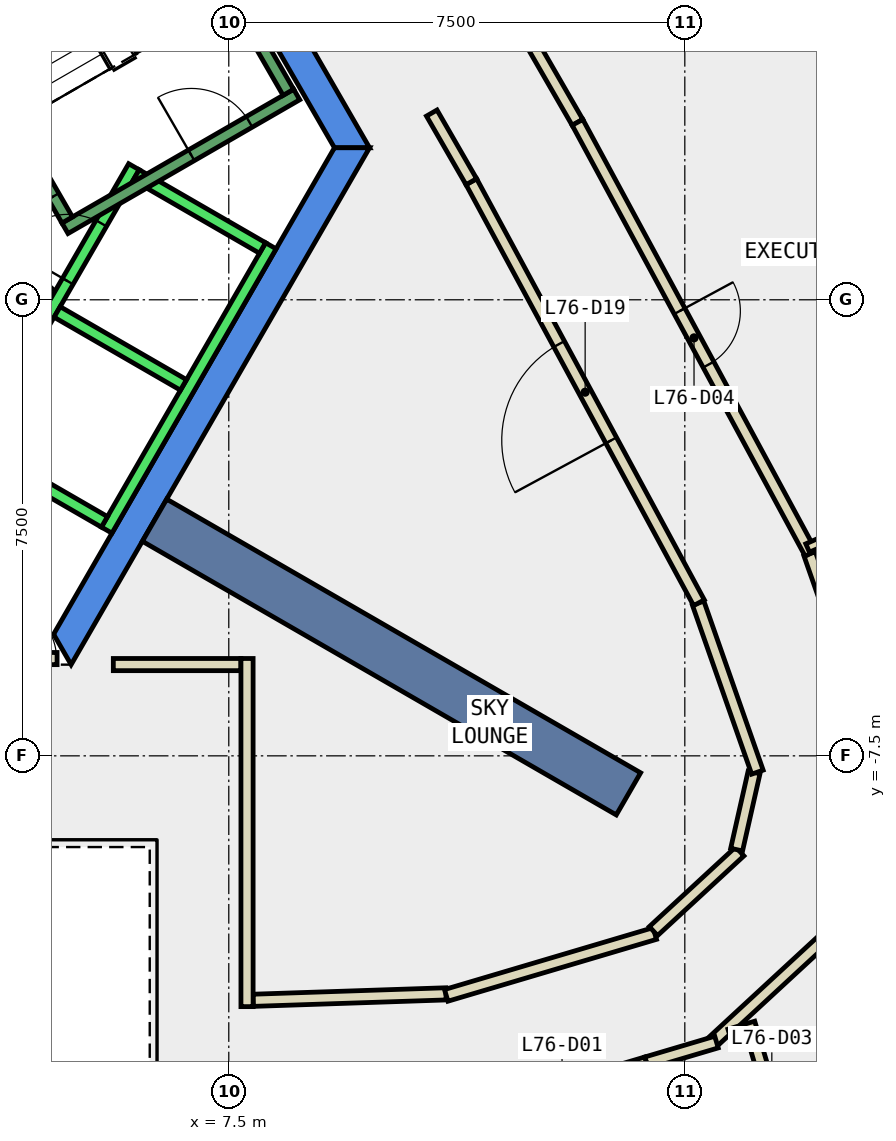
"""IFC4 building model, lengths in metres.
Left out: names, types, materials, properties, quantities, classifications, styles, units other than length and angle.
Written with IfcOpenShell. Run it as: python <this file> out.ifc"""

import sys

from ifc_helpers import new_model, si_unit, direction, frame, frame_2d, origin, place, context, subcontext, project, spatial, polyline, rectangle, outline, extrude, element, fill, save


model = new_model("IFC4")
c1 = context("Model", 3, precision=1e-05, world=origin(), true_north=direction((0.0, 1.0)))
c2 = subcontext(c1, "Body", "Model", "MODEL_VIEW")
j1 = project(units=[si_unit("LENGTHUNIT", "METRE"), si_unit("PLANEANGLEUNIT", "RADIAN")], contexts=[c1])
p1 = place(None, origin())
s1 = spatial("IfcSite", under=j1, at=p1, CompositionType="ELEMENT")
p2 = place(p1, origin())
s2 = spatial("IfcBuilding", under=s1, at=p2, CompositionType="ELEMENT")
p3 = place(p2, frame((0.0, 0.0, 322.4)))
s3 = spatial("IfcBuildingStorey", under=s2, at=p3, CompositionType="ELEMENT", Elevation=322.4)
p4 = place(p3, frame((0.0, 0.0, -0.34)))
e1 = element("IfcWall", 1, at=p4, inside=s3, PredefinedType="SHEAR", context=c2, shape_type="SweptSolid", body=[
    extrude(outline(polyline([(5.486, 9.998), (5.053, 9.748), (9.238, 2.5), (9.815, 2.5), (5.486, 9.998)])), origin(), (0.0, 0.0, 1.0), 3.34),
])
p5 = place(p3, frame((0.0, 0.0, -0.34)))
e2 = element("IfcWall", 2, at=p5, inside=s3, PredefinedType="SHEAR", context=c2, shape_type="SweptSolid", body=[
    extrude(outline(polyline([(4.907, -6.0), (9.815, 2.5), (9.238, 2.5), (4.619, -5.5), (4.907, -6.0)])), origin(), (0.0, 0.0, 1.0), 3.34),
])
p6 = place(p3, frame((6.279, -3.625, -0.34), z_axis=(0.0, 0.0, 1.0), x_axis=(0.866017533419, -0.500013631625, 0.0)))
e3 = element("IfcWall", 3, at=p6, inside=s3, PredefinedType="SHEAR", context=c2, shape_type="SweptSolid", body=[
    extrude(rectangle(XDim=9.0, YDim=0.8, at=frame_2d((4.5, 0.0))), origin(), (0.0, 0.0, 1.0), 3.34),
])
p7 = place(p3, frame((7.9, -11.52, 0.0), z_axis=(0.0, 0.0, 1.0), x_axis=(0.999442599499, 0.033383982774, 0.0)))
e4 = element("IfcWall", 4, at=p7, inside=s3, PredefinedType="PARTITIONING", context=c2, shape_type="SweptSolid", body=[
    extrude(rectangle(XDim=3.174, YDim=0.2, at=frame_2d((1.587, 0.0))), origin(), (0.0, 0.0, 1.0), 3.0),
])
p8 = place(p3, frame((11.076, -11.439, 0.0), z_axis=(0.0, 0.0, 1.0), x_axis=(0.958760241353, 0.284216114252, 0.0)))
e5 = element("IfcWall", 5, at=p8, inside=s3, PredefinedType="PARTITIONING", context=c2, shape_type="SweptSolid", body=[
    extrude(rectangle(XDim=3.578, YDim=0.2, at=frame_2d((1.789, 0.0))), origin(), (0.0, 0.0, 1.0), 3.0),
])
p9 = place(p3, frame((14.484, -10.382, 0.0), z_axis=(0.0, 0.0, 1.0), x_axis=(0.735026247728, 0.678038653139, 0.0)))
e6 = element("IfcWall", 6, at=p9, inside=s3, PredefinedType="PARTITIONING", context=c2, shape_type="SweptSolid", body=[
    extrude(rectangle(XDim=1.932, YDim=0.2, at=frame_2d((0.966, 0.0))), origin(), (0.0, 0.0, 1.0), 3.0),
])
p10 = place(p3, frame((15.852, -9.042, 0.0), z_axis=(0.0, 0.0, 1.0), x_axis=(0.220324178782, 0.975426704701, 0.0)))
e7 = element("IfcWall", 7, at=p10, inside=s3, PredefinedType="PARTITIONING", context=c2, shape_type="SweptSolid", body=[
    extrude(rectangle(XDim=1.302, YDim=0.2, at=frame_2d((0.651, 0.0))), origin(), (0.0, 0.0, 1.0), 3.0),
])
p11 = place(p3, frame((16.194, -7.768, 0.0), z_axis=(0.0, 0.0, 1.0), x_axis=(-0.330981563235, 0.943637220969, 0.0)))
e8 = element("IfcWall", 8, at=p11, inside=s3, PredefinedType="PARTITIONING", context=c2, shape_type="SweptSolid", body=[
    extrude(rectangle(XDim=2.946, YDim=0.2, at=frame_2d((1.473, 0.0))), origin(), (0.0, 0.0, 1.0), 3.0),
])
p12 = place(p3, frame((15.233, -4.982, 0.0), z_axis=(0.0, 0.0, 1.0), x_axis=(-0.475643534049, 0.879638123615, 0.0)))
e9 = element("IfcWall", 9, at=p12, inside=s3, PredefinedType="PARTITIONING", context=c2, shape_type="SweptSolid", body=[
    extrude(rectangle(XDim=7.871, YDim=0.2, at=frame_2d((3.936, 0.0))), origin(), (0.0, 0.0, 1.0), 3.0),
])
p13 = place(p12, frame((3.036, 0.0, 0.0)))
e10 = element("IfcOpeningElement", 10, at=p13, cuts=e9, PredefinedType="OPENING", context=c2, shape_type="SweptSolid", body=[
    extrude(rectangle(XDim=1.8, YDim=2.1, at=frame_2d((0.9, 1.05))), frame((0.0, 0.11, 0.0), z_axis=(0.0, -1.0, 0.0), x_axis=(1.0, 0.0, 0.0)), (0.0, 0.0, 1.0), 0.22),
])
p14 = place(p3, frame((11.489, 1.942, 0.0), z_axis=(0.0, 0.0, 1.0), x_axis=(-0.499544076393, 0.866288471435, 0.0)))
e11 = element("IfcWall", 11, at=p14, inside=s3, PredefinedType="PARTITIONING", context=c2, shape_type="SweptSolid", body=[
    extrude(rectangle(XDim=1.303, YDim=0.2, at=frame_2d((0.652, 0.0))), origin(), (0.0, 0.0, 1.0), 3.0),
])
p15 = place(p3, frame((14.371, -12.548, 0.0), z_axis=(0.0, 0.0, 1.0), x_axis=(-0.958773475867, -0.284171465799, 0.0)))
e12 = element("IfcWall", 12, at=p15, inside=s3, PredefinedType="PARTITIONING", context=c2, shape_type="SweptSolid", body=[
    extrude(rectangle(XDim=2.9, YDim=0.2, at=frame_2d((1.45, 0.0))), origin(), (0.0, 0.0, 1.0), 3.0),
])
p16 = place(p15, frame((0.95, 0.0, 0.0)))
e13 = element("IfcOpeningElement", 13, at=p16, cuts=e12, PredefinedType="OPENING", context=c2, shape_type="SweptSolid", body=[
    extrude(rectangle(XDim=1.0, YDim=2.1, at=frame_2d((0.5, 1.05))), frame((0.0, 0.11, 0.0), z_axis=(0.0, -1.0, 0.0), x_axis=(1.0, 0.0, 0.0)), (0.0, 0.0, 1.0), 0.22),
])
p17 = place(p3, frame((17.053, -4.177, 0.0), z_axis=(0.0, 0.0, 1.0), x_axis=(0.33112192567, -0.943587977001, 0.0)))
e14 = element("IfcWall", 14, at=p17, inside=s3, PredefinedType="PARTITIONING", context=c2, shape_type="SweptSolid", body=[
    extrude(rectangle(XDim=3.678, YDim=0.2, at=frame_2d((1.839, 0.0))), origin(), (0.0, 0.0, 1.0), 3.0),
])
p18 = place(p3, frame((17.718, -10.119, 0.0), z_axis=(0.0, 0.0, 1.0), x_axis=(-0.734673909713, -0.678420405344, 0.0)))
e15 = element("IfcWall", 15, at=p18, inside=s3, PredefinedType="PARTITIONING", context=c2, shape_type="SweptSolid", body=[
    extrude(rectangle(XDim=3.107, YDim=0.2, at=frame_2d((1.554, 0.0))), origin(), (0.0, 0.0, 1.0), 3.0),
])
p19 = place(p3, frame((15.521, -12.207, 0.0), z_axis=(0.0, 0.0, 1.0), x_axis=(-0.958717989575, -0.2843586054, 0.0)))
e16 = element("IfcWall", 16, at=p19, inside=s3, PredefinedType="PARTITIONING", context=c2, shape_type="SweptSolid", body=[
    extrude(rectangle(XDim=1.199, YDim=0.2, at=frame_2d((0.6, 0.0))), origin(), (0.0, 0.0, 1.0), 3.0),
])
p20 = place(p3, frame((11.344, 6.193, 0.0), z_axis=(0.0, 0.0, 1.0), x_axis=(0.50004096614, -0.86600175068, 0.0)))
e17 = element("IfcWall", 17, at=p20, inside=s3, PredefinedType="PARTITIONING", context=c2, shape_type="SweptSolid", body=[
    extrude(rectangle(XDim=3.782, YDim=0.2, at=frame_2d((1.891, 0.0))), origin(), (0.0, 0.0, 1.0), 3.0),
])
p21 = place(p3, frame((13.235, 2.918, 0.0), z_axis=(0.0, 0.0, 1.0), x_axis=(0.475681790703, -0.879617436158, 0.0)))
e18 = element("IfcWall", 18, at=p21, inside=s3, PredefinedType="PARTITIONING", context=c2, shape_type="SweptSolid", body=[
    extrude(rectangle(XDim=8.058, YDim=0.2, at=frame_2d((4.029, 0.0))), origin(), (0.0, 0.0, 1.0), 3.0),
])
p22 = place(p21, frame((3.529, 0.0, 0.0)))
e19 = element("IfcOpeningElement", 19, at=p22, cuts=e18, PredefinedType="OPENING", context=c2, shape_type="SweptSolid", body=[
    extrude(rectangle(XDim=1.0, YDim=2.1, at=frame_2d((0.5, 1.05))), frame((0.0, 0.11, 0.0), z_axis=(0.0, -1.0, 0.0), x_axis=(1.0, 0.0, 0.0)), (0.0, 0.0, 1.0), 0.22),
])
p23 = place(p3, frame((5.601, -5.999, 0.0), z_axis=(0.0, 0.0, 1.0), x_axis=(1.0, 0.0, 0.0)))
e20 = element("IfcWall", 20, at=p23, inside=s3, PredefinedType="PARTITIONING", context=c2, shape_type="SweptSolid", body=[
    extrude(rectangle(XDim=2.099, YDim=0.2, at=frame_2d((1.049, 0.0))), origin(), (0.0, 0.0, 1.0), 3.0),
])
p24 = place(p3, frame((7.8, -5.899, 0.0), z_axis=(0.0, 0.0, 1.0), x_axis=(0.0, -1.0, 0.0)))
e21 = element("IfcWall", 21, at=p24, inside=s3, PredefinedType="PARTITIONING", context=c2, shape_type="SweptSolid", body=[
    extrude(rectangle(XDim=5.725, YDim=0.2, at=frame_2d((2.863, 0.0))), origin(), (0.0, 0.0, 1.0), 3.0),
])
p25 = place(p3, frame((16.808, -14.433, 0.0), z_axis=(0.0, 0.0, 1.0), x_axis=(-0.284524220245, 0.958668852156, 0.0)))
e22 = element("IfcWall", 22, at=p25, inside=s3, PredefinedType="PARTITIONING", context=c2, shape_type="SweptSolid", body=[
    extrude(rectangle(XDim=2.651, YDim=0.2, at=frame_2d((1.325, 0.0))), origin(), (0.0, 0.0, 1.0), 3.0),
])
p26 = place(p25, frame((0.875, 0.0, 0.0)))
e23 = element("IfcOpeningElement", 23, at=p26, cuts=e22, PredefinedType="OPENING", context=c2, shape_type="SweptSolid", body=[
    extrude(rectangle(XDim=0.9, YDim=2.1, at=frame_2d((0.45, 1.05))), frame((0.0, 0.11, 0.0), z_axis=(0.0, -1.0, 0.0), x_axis=(1.0, 0.0, 0.0)), (0.0, 0.0, 1.0), 0.22),
])
p27 = place(p3, frame((15.987, -12.017, 0.0), z_axis=(0.0, 0.0, 1.0), x_axis=(-0.958598776535, -0.284760224794, 0.0)))
e24 = element("IfcWall", 24, at=p27, inside=s3, PredefinedType="PARTITIONING", context=c2, shape_type="SweptSolid", body=[
    extrude(rectangle(XDim=0.26, YDim=0.2, at=frame_2d((0.13, 0.0))), origin(), (0.0, 0.0, 1.0), 3.0),
])
p28 = place(p3, frame((17.02, -4.082, 0.0), z_axis=(0.0, 0.0, 1.0), x_axis=(0.914599611743, 0.404360668462, 0.0)))
e25 = element("IfcWall", 25, at=p28, inside=s3, PredefinedType="PARTITIONING", context=c2, shape_type="SweptSolid", body=[
    extrude(rectangle(XDim=4.296, YDim=0.15, at=frame_2d((2.148, 0.0))), origin(), (0.0, 0.0, 1.0), 3.0),
])
p29 = place(p3, frame((3.75, -5.9, 0.0), z_axis=(0.0, 0.0, 1.0), x_axis=(1.0, 0.0, 0.0)))
e26 = element("IfcWall", 26, at=p29, inside=s3, PredefinedType="PARTITIONING", context=c2, shape_type="SweptSolid", body=[
    extrude(rectangle(XDim=0.926, YDim=0.2, at=frame_2d((0.463, 0.0))), origin(), (0.0, 0.0, 1.0), 2.4),
])
p30 = place(p29, frame((0.017, 0.0, 0.0)))
e27 = element("IfcOpeningElement", 27, at=p30, cuts=e26, PredefinedType="OPENING", context=c2, shape_type="SweptSolid", body=[
    extrude(rectangle(XDim=0.9, YDim=2.1, at=frame_2d((0.45, 1.05))), frame((0.0, 0.11, 0.0), z_axis=(0.0, -1.0, 0.0), x_axis=(1.0, 0.0, 0.0)), (0.0, 0.0, 1.0), 0.22),
])
p31 = place(p3, frame((3.24, -2.488, 0.0), z_axis=(0.0, 0.0, 1.0), x_axis=(0.500034260056, 0.866005622828, 0.0)))
e28 = element("IfcWall", 28, at=p31, inside=s3, PredefinedType="STANDARD", context=c2, shape_type="SweptSolid", body=[
    extrude(rectangle(XDim=5.399, YDim=0.2, at=frame_2d((2.7, 0.0))), origin(), (0.0, 0.0, 1.0), 3.0),
])
p32 = place(p31, frame((3.225, 0.0, 0.0)))
e29 = element("IfcOpeningElement", 29, at=p32, cuts=e28, PredefinedType="OPENING", context=c2, shape_type="SweptSolid", body=[
    extrude(rectangle(XDim=1.1, YDim=2.1, at=frame_2d((0.55, 1.05))), frame((0.0, 0.11, 0.0), z_axis=(0.0, -1.0, 0.0), x_axis=(1.0, 0.0, 0.0)), (0.0, 0.0, 1.0), 0.22),
])
p33 = place(p31, frame((1.225, 0.0, 0.0)))
e30 = element("IfcOpeningElement", 30, at=p33, cuts=e28, PredefinedType="OPENING", context=c2, shape_type="SweptSolid", body=[
    extrude(rectangle(XDim=1.1, YDim=2.1, at=frame_2d((0.55, 1.05))), frame((0.0, 0.11, 0.0), z_axis=(0.0, -1.0, 0.0), x_axis=(1.0, 0.0, 0.0)), (0.0, 0.0, 1.0), 0.22),
])
p34 = place(p3, frame((5.492, -3.788, 0.0), z_axis=(0.0, 0.0, 1.0), x_axis=(0.500034260056, 0.866005622828, 0.0)))
e31 = element("IfcWall", 31, at=p34, inside=s3, PredefinedType="STANDARD", context=c2, shape_type="SweptSolid", body=[
    extrude(rectangle(XDim=5.399, YDim=0.2, at=frame_2d((2.7, 0.0))), origin(), (0.0, 0.0, 1.0), 3.0),
])
p35 = place(p3, frame((3.377, -2.452, 0.0), z_axis=(0.0, 0.0, 1.0), x_axis=(0.865955154139, -0.50012165622, 0.0)))
e32 = element("IfcWall", 32, at=p35, inside=s3, PredefinedType="STANDARD", context=c2, shape_type="SweptSolid", body=[
    extrude(rectangle(XDim=2.4, YDim=0.2, at=frame_2d((1.2, 0.0))), origin(), (0.0, 0.0, 1.0), 3.0),
])
for number, where, z_axis, x_axis in (
    (33, (4.677, -0.2, 0.0), (0.0, 0.0, 1.0), (0.866, -0.5, 0.0)),
    (34, (5.977, 2.052, 0.0), (0.0, 0.0, 1.0), (0.866, -0.5, 0.0)),
):
    element("IfcWall", number, at=place(p3, frame(where, z_axis=z_axis, x_axis=x_axis)), inside=s3, PredefinedType="STANDARD", context=c2, shape_type="SweptSolid", body=[
        extrude(rectangle(XDim=2.399, YDim=0.2, at=frame_2d((1.2, 0.0))), origin(), (0.0, 0.0, 1.0), 3.0),
    ])
p36 = place(p3, frame((4.806, 1.176, 0.0), z_axis=(0.0, 0.0, 1.0), x_axis=(0.866059941101, 0.499940174841, 0.0)))
e35 = element("IfcWall", 35, at=p36, inside=s3, PredefinedType="STANDARD", context=c2, shape_type="SweptSolid", body=[
    extrude(rectangle(XDim=4.4, YDim=0.2, at=frame_2d((2.2, 0.0))), origin(), (0.0, 0.0, 1.0), 3.0),
])
p37 = place(p36, frame((2.4, 0.0, 0.0)))
e36 = element("IfcOpeningElement", 36, at=p37, cuts=e35, PredefinedType="OPENING", context=c2, shape_type="SweptSolid", body=[
    extrude(rectangle(XDim=1.1, YDim=2.2, at=frame_2d((0.55, 1.1))), frame((0.0, 0.11, 0.0), z_axis=(0.0, -1.0, 0.0), x_axis=(1.0, 0.0, 0.0)), (0.0, 0.0, 1.0), 0.22),
])
p38 = place(p3, frame((4.843, 1.312, 0.0), z_axis=(0.0, 0.0, 1.0), x_axis=(-0.499963383562, 0.866046543262, 0.0)))
e37 = element("IfcWall", 37, at=p38, inside=s3, PredefinedType="STANDARD", context=c2, shape_type="SweptSolid", body=[
    extrude(rectangle(XDim=6.9, YDim=0.2, at=frame_2d((3.45, 0.0))), origin(), (0.0, 0.0, 1.0), 3.0),
])
p39 = place(p38, frame((0.45, 0.0, 0.0)))
e38 = element("IfcOpeningElement", 38, at=p39, cuts=e37, PredefinedType="OPENING", context=c2, shape_type="SweptSolid", body=[
    extrude(rectangle(XDim=1.1, YDim=2.2, at=frame_2d((0.55, 1.1))), frame((0.0, 0.11, 0.0), z_axis=(0.0, -1.0, 0.0), x_axis=(1.0, 0.0, 0.0)), (0.0, 0.0, 1.0), 0.22),
])
p40 = place(p3, frame((8.48, 3.412, 0.0), z_axis=(0.0, 0.0, 1.0), x_axis=(-0.499978703459, 0.866037698999, 0.0)))
e39 = element("IfcWall", 39, at=p40, inside=s3, PredefinedType="STANDARD", context=c2, shape_type="SweptSolid", body=[
    extrude(rectangle(XDim=6.9, YDim=0.2, at=frame_2d((3.45, 0.0))), origin(), (0.0, 0.0, 1.0), 3.0),
])
p41 = place(p22, origin())
e40 = element("IfcDoor", 40, at=p41, inside=s3, OperationType="SINGLE_SWING_LEFT", PredefinedType="DOOR", context=c2, shape_type="SweptSolid", body=[
    extrude(rectangle(XDim=1.0, YDim=2.1, at=frame_2d((0.5, 1.05))), frame((0.0, 0.025, 0.0), z_axis=(0.0, -1.0, 0.0), x_axis=(1.0, 0.0, 0.0)), (0.0, 0.0, 1.0), 0.05),
])
fill(e19, e40)
p42 = place(p13, origin())
e41 = element("IfcDoor", 41, at=p42, inside=s3, OperationType="DOUBLE_DOOR_SINGLE_SWING", PredefinedType="DOOR", context=c2, shape_type="SweptSolid", body=[
    extrude(rectangle(XDim=1.8, YDim=2.1, at=frame_2d((0.9, 1.05))), frame((0.0, 0.025, 0.0), z_axis=(0.0, -1.0, 0.0), x_axis=(1.0, 0.0, 0.0)), (0.0, 0.0, 1.0), 0.05),
])
fill(e10, e41)
p43 = place(p30, origin())
e42 = element("IfcDoor", 42, at=p43, inside=s3, OperationType="SINGLE_SWING_LEFT", PredefinedType="DOOR", context=c2, shape_type="SweptSolid", body=[
    extrude(rectangle(XDim=0.9, YDim=2.1, at=frame_2d((0.45, 1.05))), frame((0.0, 0.025, 0.0), z_axis=(0.0, -1.0, 0.0), x_axis=(1.0, 0.0, 0.0)), (0.0, 0.0, 1.0), 0.05),
])
fill(e27, e42)
p44 = place(p32, origin())
e43 = element("IfcDoor", 43, at=p44, inside=s3, OperationType="SLIDING_TO_LEFT", PredefinedType="DOOR", context=c2, shape_type="SweptSolid", body=[
    extrude(rectangle(XDim=1.1, YDim=2.1, at=frame_2d((0.55, 1.05))), frame((0.0, 0.025, 0.0), z_axis=(0.0, -1.0, 0.0), x_axis=(1.0, 0.0, 0.0)), (0.0, 0.0, 1.0), 0.05),
])
fill(e29, e43)
p45 = place(p39, origin())
e44 = element("IfcDoor", 44, at=p45, inside=s3, OperationType="SINGLE_SWING_LEFT", PredefinedType="DOOR", context=c2, shape_type="SweptSolid", body=[
    extrude(rectangle(XDim=1.1, YDim=2.2, at=frame_2d((0.55, 1.1))), frame((0.0, 0.025, 0.0), z_axis=(0.0, -1.0, 0.0), x_axis=(1.0, 0.0, 0.0)), (0.0, 0.0, 1.0), 0.05),
])
fill(e38, e44)
p46 = place(p37, origin())
e45 = element("IfcDoor", 45, at=p46, inside=s3, OperationType="SINGLE_SWING_LEFT", PredefinedType="DOOR", context=c2, shape_type="SweptSolid", body=[
    extrude(rectangle(XDim=1.1, YDim=2.2, at=frame_2d((0.55, 1.1))), frame((0.0, 0.025, 0.0), z_axis=(0.0, -1.0, 0.0), x_axis=(1.0, 0.0, 0.0)), (0.0, 0.0, 1.0), 0.05),
])
fill(e36, e45)
save(model, sys.argv[1])
